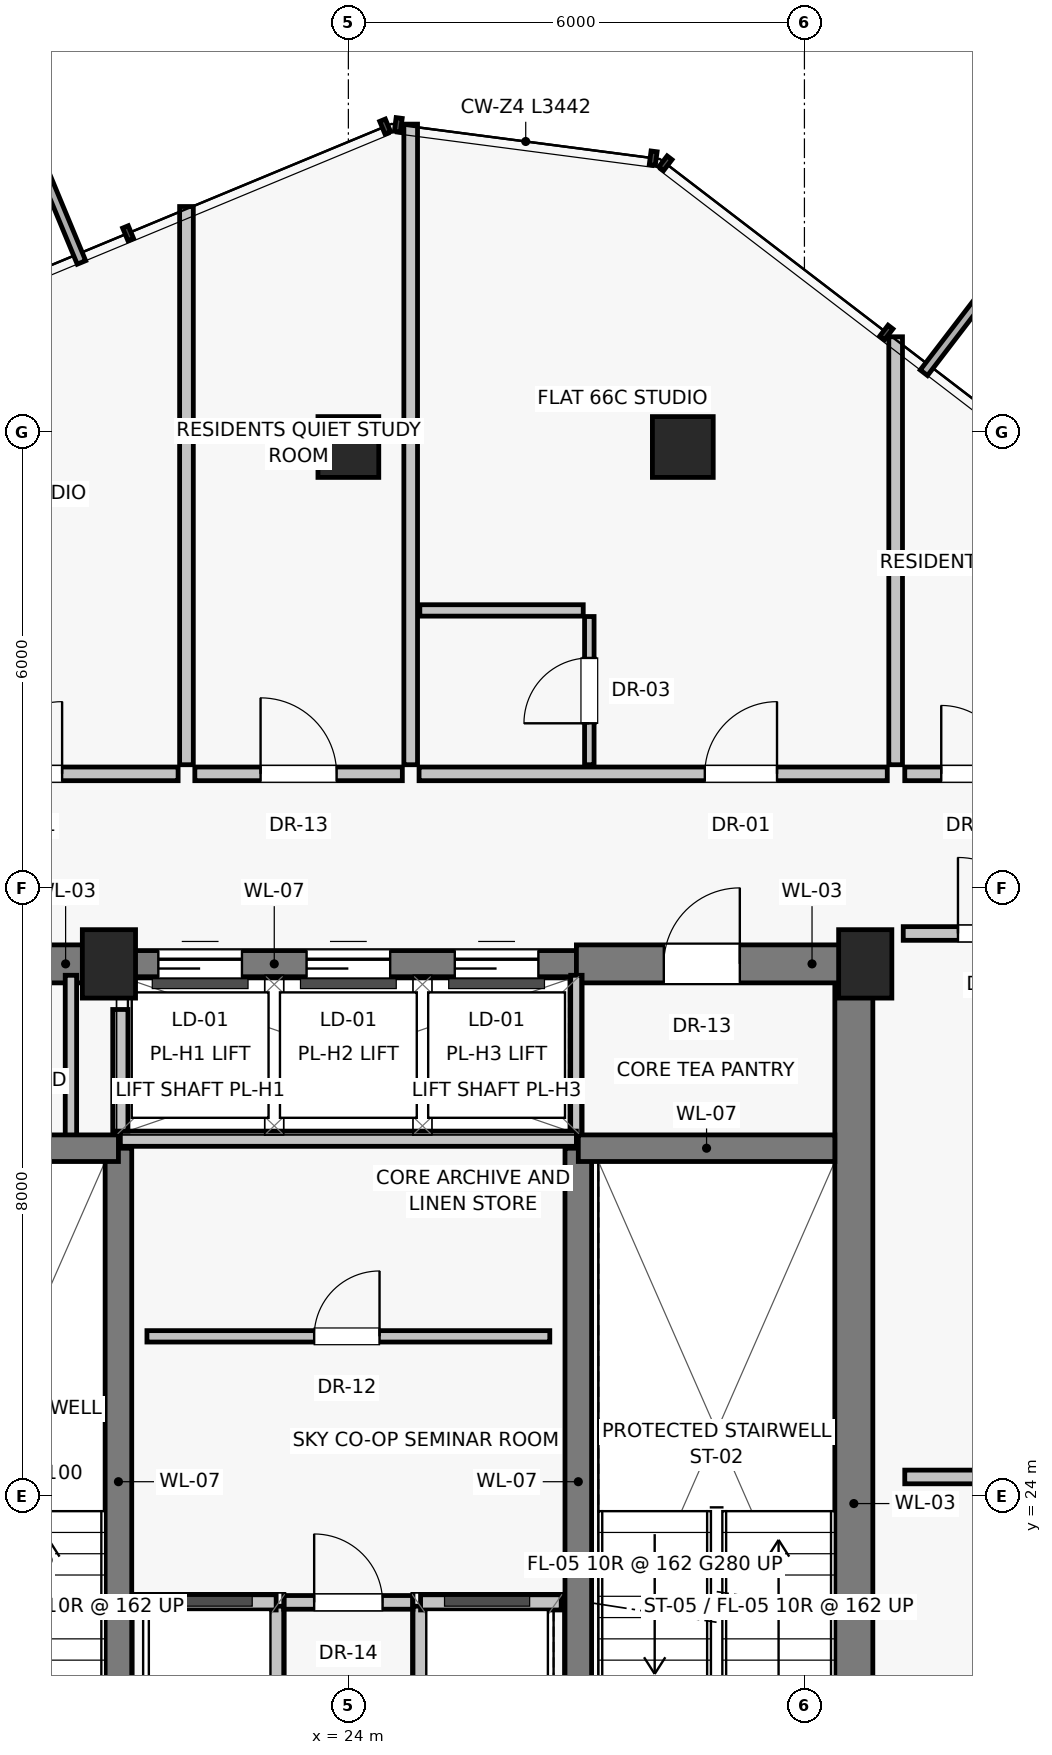
"""IFC4 building model, lengths in metres.
Left out: names, types, materials, properties, quantities, classifications, styles, units other than length and angle.
Written with IfcOpenShell. Run it as: python <this file> out.ifc"""

import sys

from ifc_helpers import new_model, si_unit, direction, frame, frame_2d, origin, origin_2d, place, context, subcontext, project, spatial, rectangle, extrude, source, transform, mapped, element, fill, save


model = new_model("IFC4")
c1 = context("Model", 3, precision=1e-05, world=origin(), true_north=direction((0.0, 1.0)))
c2 = subcontext(c1, "Body", "Model", "MODEL_VIEW")
j1 = project(units=[si_unit("LENGTHUNIT", "METRE"), si_unit("PLANEANGLEUNIT", "RADIAN")], contexts=[c1])
p1 = place(None, origin())
s1 = spatial("IfcSite", under=j1, at=p1, CompositionType="ELEMENT")
p2 = place(p1, origin())
s2 = spatial("IfcBuilding", under=s1, at=p2, CompositionType="ELEMENT")
p3 = place(p2, frame((0.0, 0.0, 233.3)))
s3 = spatial("IfcBuildingStorey", under=s2, at=p3, CompositionType="ELEMENT", Elevation=233.3)
for number, where, z_axis, x_axis in (
    (1, (20.85, 31.0, 0.0), (0.0, 0.0, 1.0), (1.0, 0.0, 0.0)),
    (2, (30.8, 31.0, 0.0), (0.0, 0.0, 1.0), (1.0, 0.0, 0.0)),
):
    element("IfcColumn", number, at=place(p3, frame(where, z_axis=z_axis, x_axis=x_axis)), inside=s3, PredefinedType="PILASTER", context=c2, shape_type="SweptSolid", body=[
        extrude(rectangle(XDim=0.7, YDim=0.9, at=origin_2d()), origin(), (0.0, 0.0, 1.0), 3.25),
    ])
for number, where, z_axis, x_axis in (
    (3, (28.4, 37.8, 0.0), (0.0, 0.0, 1.0), (1.0, 0.0, 0.0)),
    (4, (24.0, 37.8, 0.0), (0.0, 0.0, 1.0), (1.0, 0.0, 0.0)),
):
    element("IfcColumn", number, at=place(p3, frame(where, z_axis=z_axis, x_axis=x_axis)), inside=s3, PredefinedType="COLUMN", context=c2, shape_type="SweptSolid", body=[
        extrude(rectangle(XDim=0.8, YDim=0.8, at=origin_2d()), origin(), (0.0, 0.0, 1.0), 3.25),
    ])
p4 = place(p3, frame((30.65, 16.8, 0.0), z_axis=(0.0, 0.0, 1.0), x_axis=(0.0, 1.0, 0.0)))
e5 = element("IfcWall", 5, at=p4, inside=s3, PredefinedType="SHEAR", context=c2, shape_type="SweptSolid", body=[
    extrude(rectangle(XDim=14.2, YDim=0.5, at=frame_2d((7.1, 0.0))), origin(), (0.0, 0.0, 1.0), 3.015),
])
p5 = place(p3, frame((17.2, 31.0, 0.0), z_axis=(0.0, 0.0, 1.0), x_axis=(1.0, 0.0, 0.0)))
e6 = element("IfcWall", 6, at=p5, inside=s3, PredefinedType="SHEAR", context=c2, shape_type="SweptSolid", body=[
    extrude(rectangle(XDim=3.8, YDim=0.5, at=frame_2d((1.9, 0.0))), origin(), (0.0, 0.0, 1.0), 3.015),
])
p6 = place(p5, frame((1.25, 0.0, 0.0)))
e7 = element("IfcOpeningElement", 7, at=p6, cuts=e6, PredefinedType="OPENING", context=c2, shape_type="SweptSolid", body=[
    extrude(rectangle(XDim=0.86, YDim=2.01, at=frame_2d((0.43, 1.005))), frame((0.0, 0.26, 0.0), z_axis=(0.0, -1.0, 0.0), x_axis=(1.0, 0.0, 0.0)), (0.0, 0.0, 1.0), 0.52),
])
p7 = place(p3, frame((21.0, 31.0, 0.0), z_axis=(0.0, 0.0, 1.0), x_axis=(1.0, 0.0, 0.0)))
e8 = element("IfcWall", 8, at=p7, inside=s3, PredefinedType="SHEAR", context=c2, shape_type="SweptSolid", body=[
    extrude(rectangle(XDim=6.0, YDim=0.35, at=frame_2d((3.0, 0.0))), origin(), (0.0, 0.0, 1.0), 3.015),
])
p8 = place(p7, frame((0.5, 0.0, 0.0)))
e9 = element("IfcOpeningElement", 9, at=p8, cuts=e8, PredefinedType="OPENING", context=c2, shape_type="SweptSolid", body=[
    extrude(rectangle(XDim=1.1, YDim=2.08, at=frame_2d((0.55, 1.04))), frame((0.0, 0.185, 0.0), z_axis=(0.0, -1.0, 0.0), x_axis=(1.0, 0.0, 0.0)), (0.0, 0.0, 1.0), 0.37),
])
p9 = place(p7, frame((2.45, 0.0, 0.0)))
e10 = element("IfcOpeningElement", 10, at=p9, cuts=e8, PredefinedType="OPENING", context=c2, shape_type="SweptSolid", body=[
    extrude(rectangle(XDim=1.1, YDim=2.08, at=frame_2d((0.55, 1.04))), frame((0.0, 0.185, 0.0), z_axis=(0.0, -1.0, 0.0), x_axis=(1.0, 0.0, 0.0)), (0.0, 0.0, 1.0), 0.37),
])
p10 = place(p7, frame((4.4, 0.0, 0.0)))
e11 = element("IfcOpeningElement", 11, at=p10, cuts=e8, PredefinedType="OPENING", context=c2, shape_type="SweptSolid", body=[
    extrude(rectangle(XDim=1.1, YDim=2.08, at=frame_2d((0.55, 1.04))), frame((0.0, 0.185, 0.0), z_axis=(0.0, -1.0, 0.0), x_axis=(1.0, 0.0, 0.0)), (0.0, 0.0, 1.0), 0.37),
])
p11 = place(p3, frame((27.0, 31.0, 0.0), z_axis=(0.0, 0.0, 1.0), x_axis=(1.0, 0.0, 0.0)))
e12 = element("IfcWall", 12, at=p11, inside=s3, PredefinedType="SHEAR", context=c2, shape_type="SweptSolid", body=[
    extrude(rectangle(XDim=3.8, YDim=0.5, at=frame_2d((1.9, 0.0))), origin(), (0.0, 0.0, 1.0), 3.015),
])
p12 = place(p11, frame((1.15, 0.0, 0.0)))
e13 = element("IfcOpeningElement", 13, at=p12, cuts=e12, PredefinedType="OPENING", context=c2, shape_type="SweptSolid", body=[
    extrude(rectangle(XDim=1.0, YDim=2.01, at=frame_2d((0.5, 1.005))), frame((0.0, 0.26, 0.0), z_axis=(0.0, -1.0, 0.0), x_axis=(1.0, 0.0, 0.0)), (0.0, 0.0, 1.0), 0.52),
])
for number, where, z_axis, x_axis in (
    (14, (20.35, 28.65, 0.0), (0.0, 0.0, 1.0), (0.0, 1.0, 0.0)),
    (15, (27.0, 28.65, 0.0), (0.0, 0.0, 1.0), (0.0, 1.0, 0.0)),
):
    element("IfcWall", number, at=place(p3, frame(where, z_axis=z_axis, x_axis=x_axis)), inside=s3, PredefinedType="PARTITIONING", context=c2, shape_type="SweptSolid", body=[
        extrude(rectangle(XDim=2.2, YDim=0.15, at=frame_2d((1.1, 0.0))), origin(), (0.0, 0.0, 1.0), 3.015),
    ])
for number, where, z_axis, x_axis in (
    (16, (20.975, 19.8, 0.0), (0.0, 0.0, 1.0), (0.0, 1.0, 0.0)),
    (17, (27.025, 19.8, 0.0), (0.0, 0.0, 1.0), (0.0, 1.0, 0.0)),
):
    element("IfcWall", number, at=place(p3, frame(where, z_axis=z_axis, x_axis=x_axis)), inside=s3, PredefinedType="SHEAR", context=c2, shape_type="SweptSolid", body=[
        extrude(rectangle(XDim=8.775, YDim=0.35, at=frame_2d((4.387, 0.0))), origin(), (0.0, 0.0, 1.0), 3.015),
    ])
for number, where, z_axis, x_axis in (
    (18, (17.6, 28.575, 0.0), (0.0, 0.0, 1.0), (1.0, 0.0, 0.0)),
    (19, (27.025, 28.575, 0.0), (0.0, 0.0, 1.0), (1.0, 0.0, 0.0)),
):
    element("IfcWall", number, at=place(p3, frame(where, z_axis=z_axis, x_axis=x_axis)), inside=s3, PredefinedType="SHEAR", context=c2, shape_type="SweptSolid", body=[
        extrude(rectangle(XDim=3.375, YDim=0.35, at=frame_2d((1.688, 0.0))), origin(), (0.0, 0.0, 1.0), 3.015),
    ])
for number, where, z_axis, x_axis in (
    (20, (23.05, 16.95, 0.0), (0.0, 0.0, 1.0), (0.0, 1.0, 0.0)),
    (21, (24.95, 16.95, 0.0), (0.0, 0.0, 1.0), (0.0, 1.0, 0.0)),
):
    element("IfcWall", number, at=place(p3, frame(where, z_axis=z_axis, x_axis=x_axis)), inside=s3, PredefinedType="SOLIDWALL", context=c2, shape_type="SweptSolid", body=[
        extrude(rectangle(XDim=5.6, YDim=0.2, at=frame_2d((2.8, 0.0))), origin(), (0.0, 0.0, 1.0), 3.015),
    ])
for number, where, z_axis, x_axis in (
    (22, (21.2, 22.6, 0.0), (0.0, 0.0, 1.0), (1.0, 0.0, 0.0)),
    (23, (24.95, 22.6, 0.0), (0.0, 0.0, 1.0), (1.0, 0.0, 0.0)),
):
    element("IfcWall", number, at=place(p3, frame(where, z_axis=z_axis, x_axis=x_axis)), inside=s3, PredefinedType="SOLIDWALL", context=c2, shape_type="SweptSolid", body=[
        extrude(rectangle(XDim=1.85, YDim=0.2, at=frame_2d((0.925, 0.0))), origin(), (0.0, 0.0, 1.0), 3.015),
    ])
p13 = place(p3, frame((21.0, 28.7, 0.0), z_axis=(0.0, 0.0, 1.0), x_axis=(1.0, 0.0, 0.0)))
e24 = element("IfcWall", 24, at=p13, inside=s3, PredefinedType="SOLIDWALL", context=c2, shape_type="SweptSolid", body=[
    extrude(rectangle(XDim=6.0, YDim=0.2, at=frame_2d((3.0, 0.0))), origin(), (0.0, 0.0, 1.0), 3.015),
])
p14 = place(p3, frame((21.0, 28.8, 0.0), z_axis=(0.0, 0.0, 1.0), x_axis=(0.0, 1.0, 0.0)))
e25 = element("IfcWall", 25, at=p14, inside=s3, PredefinedType="SOLIDWALL", context=c2, shape_type="SweptSolid", body=[
    extrude(rectangle(XDim=1.6, YDim=0.2, at=frame_2d((0.8, 0.0))), origin(), (0.0, 0.0, 1.0), 3.015),
])
p15 = place(p3, frame((23.15, 22.6, 0.0), z_axis=(0.0, 0.0, 1.0), x_axis=(1.0, 0.0, 0.0)))
e26 = element("IfcWall", 26, at=p15, inside=s3, PredefinedType="PARTITIONING", context=c2, shape_type="SweptSolid", body=[
    extrude(rectangle(XDim=1.7, YDim=0.18, at=frame_2d((0.85, 0.0))), origin(), (0.0, 0.0, 1.0), 3.015),
])
p16 = place(p15, frame((0.4, 0.0, 0.0)))
e27 = element("IfcOpeningElement", 27, at=p16, cuts=e26, PredefinedType="OPENING", context=c2, shape_type="SweptSolid", body=[
    extrude(rectangle(XDim=0.9, YDim=2.01, at=frame_2d((0.45, 1.005))), frame((0.0, 0.1, 0.0), z_axis=(0.0, -1.0, 0.0), x_axis=(1.0, 0.0, 0.0)), (0.0, 0.0, 1.0), 0.2),
])
p17 = place(p3, frame((21.35, 26.1, 0.0), z_axis=(0.0, 0.0, 1.0), x_axis=(1.0, 0.0, 0.0)))
e28 = element("IfcWall", 28, at=p17, inside=s3, PredefinedType="PARTITIONING", context=c2, shape_type="SweptSolid", body=[
    extrude(rectangle(XDim=5.3, YDim=0.15, at=frame_2d((2.65, 0.0))), origin(), (0.0, 0.0, 1.0), 3.015),
])
p18 = place(p17, frame((2.2, 0.0, 0.0)))
e29 = element("IfcOpeningElement", 29, at=p18, cuts=e28, PredefinedType="OPENING", context=c2, shape_type="SweptSolid", body=[
    extrude(rectangle(XDim=0.86, YDim=2.01, at=frame_2d((0.43, 1.005))), frame((0.0, 0.085, 0.0), z_axis=(0.0, -1.0, 0.0), x_axis=(1.0, 0.0, 0.0)), (0.0, 0.0, 1.0), 0.17),
])
p19 = place(p3, frame((31.2, 33.62, 0.0), z_axis=(0.0, 0.0, 1.0), x_axis=(0.0, 1.0, 0.0)))
e30 = element("IfcWall", 30, at=p19, inside=s3, PredefinedType="PARTITIONING", context=c2, shape_type="SweptSolid", body=[
    extrude(rectangle(XDim=5.63, YDim=0.18, at=frame_2d((2.815, 0.0))), origin(), (0.0, 0.0, 1.0), 3.015),
])
p20 = place(p3, frame((21.98, 33.5, 0.0), z_axis=(0.0, 0.0, 1.0), x_axis=(1.0, 0.0, 0.0)))
e31 = element("IfcWall", 31, at=p20, inside=s3, PredefinedType="PARTITIONING", context=c2, shape_type="SweptSolid", body=[
    extrude(rectangle(XDim=2.73, YDim=0.18, at=frame_2d((1.365, 0.0))), origin(), (0.0, 0.0, 1.0), 3.015),
])
p21 = place(p20, frame((0.865, 0.0, 0.0)))
e32 = element("IfcOpeningElement", 32, at=p21, cuts=e31, PredefinedType="OPENING", context=c2, shape_type="SweptSolid", body=[
    extrude(rectangle(XDim=1.0, YDim=2.01, at=frame_2d((0.5, 1.005))), frame((0.0, 0.1, 0.0), z_axis=(0.0, -1.0, 0.0), x_axis=(1.0, 0.0, 0.0)), (0.0, 0.0, 1.0), 0.2),
])
p22 = place(p3, frame((21.87, 33.62, 0.0), z_axis=(0.0, 0.0, 1.0), x_axis=(0.0, 1.0, 0.0)))
e33 = element("IfcWall", 33, at=p22, inside=s3, PredefinedType="PARTITIONING", context=c2, shape_type="SweptSolid", body=[
    extrude(rectangle(XDim=7.344, YDim=0.18, at=frame_2d((3.672, 0.0))), origin(), (0.0, 0.0, 1.0), 3.015),
])
p23 = place(p3, frame((15.31, 33.5, 0.0), z_axis=(0.0, 0.0, 1.0), x_axis=(1.0, 0.0, 0.0)))
e34 = element("IfcWall", 34, at=p23, inside=s3, PredefinedType="PARTITIONING", context=c2, shape_type="SweptSolid", body=[
    extrude(rectangle(XDim=6.45, YDim=0.18, at=frame_2d((3.225, 0.0))), origin(), (0.0, 0.0, 1.0), 3.015),
])
p24 = place(p23, frame((3.974, 0.0, 0.0)))
e35 = element("IfcOpeningElement", 35, at=p24, cuts=e34, PredefinedType="OPENING", context=c2, shape_type="SweptSolid", body=[
    extrude(rectangle(XDim=0.95, YDim=2.02, at=frame_2d((0.475, 1.01))), frame((0.0, 0.1, 0.0), z_axis=(0.0, -1.0, 0.0), x_axis=(1.0, 0.0, 0.0)), (0.0, 0.0, 1.0), 0.2),
])
p25 = place(p3, frame((24.82, 33.62, 0.0), z_axis=(0.0, 0.0, 1.0), x_axis=(0.0, 1.0, 0.0)))
e36 = element("IfcWall", 36, at=p25, inside=s3, PredefinedType="PARTITIONING", context=c2, shape_type="SweptSolid", body=[
    extrude(rectangle(XDim=8.428, YDim=0.18, at=frame_2d((4.214, 0.0))), origin(), (0.0, 0.0, 1.0), 3.015),
])
p26 = place(p3, frame((24.93, 33.5, 0.0), z_axis=(0.0, 0.0, 1.0), x_axis=(1.0, 0.0, 0.0)))
e37 = element("IfcWall", 37, at=p26, inside=s3, PredefinedType="PARTITIONING", context=c2, shape_type="SweptSolid", body=[
    extrude(rectangle(XDim=6.16, YDim=0.18, at=frame_2d((3.08, 0.0))), origin(), (0.0, 0.0, 1.0), 3.015),
])
p27 = place(p26, frame((3.76, 0.0, 0.0)))
e38 = element("IfcOpeningElement", 38, at=p27, cuts=e37, PredefinedType="OPENING", context=c2, shape_type="SweptSolid", body=[
    extrude(rectangle(XDim=0.95, YDim=2.02, at=frame_2d((0.475, 1.01))), frame((0.0, 0.1, 0.0), z_axis=(0.0, -1.0, 0.0), x_axis=(1.0, 0.0, 0.0)), (0.0, 0.0, 1.0), 0.2),
])
p28 = place(p3, frame((27.17, 33.62, 0.0), z_axis=(0.0, 0.0, 1.0), x_axis=(0.0, 1.0, 0.0)))
e39 = element("IfcWall", 39, at=p28, inside=s3, PredefinedType="PARTITIONING", context=c2, shape_type="SweptSolid", body=[
    extrude(rectangle(XDim=1.95, YDim=0.125, at=frame_2d((0.975, 0.0))), origin(), (0.0, 0.0, 1.0), 3.015),
])
p29 = place(p28, frame((0.545, 0.0, 0.0)))
e40 = element("IfcOpeningElement", 40, at=p29, cuts=e39, PredefinedType="OPENING", context=c2, shape_type="SweptSolid", body=[
    extrude(rectangle(XDim=0.86, YDim=2.01, at=frame_2d((0.43, 1.005))), frame((0.0, 0.073, 0.0), z_axis=(0.0, -1.0, 0.0), x_axis=(1.0, 0.0, 0.0)), (0.0, 0.0, 1.0), 0.145),
])
p30 = place(p3, frame((24.94, 35.65, 0.0), z_axis=(0.0, 0.0, 1.0), x_axis=(1.0, 0.0, 0.0)))
e41 = element("IfcWall", 41, at=p30, inside=s3, PredefinedType="PARTITIONING", context=c2, shape_type="SweptSolid", body=[
    extrude(rectangle(XDim=2.15, YDim=0.15, at=frame_2d((1.075, 0.0))), origin(), (0.0, 0.0, 1.0), 3.015),
])
p31 = place(p3, frame((31.32, 24.25, 0.0), z_axis=(0.0, 0.0, 1.0), x_axis=(1.0, 0.0, 0.0)))
e42 = element("IfcWall", 42, at=p31, inside=s3, PredefinedType="PARTITIONING", context=c2, shape_type="SweptSolid", body=[
    extrude(rectangle(XDim=9.338, YDim=0.18, at=frame_2d((4.669, 0.0))), origin(), (0.0, 0.0, 1.0), 3.015),
])
p32 = place(p3, frame((31.3, 31.4, 0.0), z_axis=(0.0, 0.0, 1.0), x_axis=(1.0, 0.0, 0.0)))
e43 = element("IfcWall", 43, at=p32, inside=s3, PredefinedType="PARTITIONING", context=c2, shape_type="SweptSolid", body=[
    extrude(rectangle(XDim=1.92, YDim=0.18, at=frame_2d((0.96, 0.0))), origin(), (0.0, 0.0, 1.0), 3.015),
])
p33 = place(p32, frame((0.72, 0.0, 0.0)))
e44 = element("IfcOpeningElement", 44, at=p33, cuts=e43, PredefinedType="OPENING", context=c2, shape_type="SweptSolid", body=[
    extrude(rectangle(XDim=1.0, YDim=2.01, at=frame_2d((0.5, 1.005))), frame((0.0, 0.1, 0.0), z_axis=(0.0, -1.0, 0.0), x_axis=(1.0, 0.0, 0.0)), (0.0, 0.0, 1.0), 0.2),
])
p34 = place(p3, frame((31.32, 33.5, 0.0), z_axis=(0.0, 0.0, 1.0), x_axis=(1.0, 0.0, 0.0)))
e45 = element("IfcWall", 45, at=p34, inside=s3, PredefinedType="PARTITIONING", context=c2, shape_type="SweptSolid", body=[
    extrude(rectangle(XDim=1.86, YDim=0.18, at=frame_2d((0.93, 0.0))), origin(), (0.0, 0.0, 1.0), 3.015),
])
p35 = place(p34, frame((0.48, 0.0, 0.0)))
e46 = element("IfcOpeningElement", 46, at=p35, cuts=e45, PredefinedType="OPENING", context=c2, shape_type="SweptSolid", body=[
    extrude(rectangle(XDim=0.9, YDim=2.01, at=frame_2d((0.45, 1.005))), frame((0.0, 0.1, 0.0), z_axis=(0.0, -1.0, 0.0), x_axis=(1.0, 0.0, 0.0)), (0.0, 0.0, 1.0), 0.2),
])
m1 = source(origin(), c2, "Body", "SweptSolid", [
    extrude(rectangle(XDim=1.1, YDim=2.08, at=frame_2d((0.55, 1.04))), frame((0.0, 0.025, 0.0), z_axis=(0.0, -1.0, 0.0), x_axis=(1.0, 0.0, 0.0)), (0.0, 0.0, 1.0), 0.05),
])
p36 = place(p8, origin())
e47 = element("IfcDoor", 47, at=p36, inside=s3, OperationType="SLIDING_TO_LEFT", PredefinedType="DOOR", context=c2, shape_type="MappedRepresentation", body=[
    mapped(m1, transform((0.0, 0.0, 0.0), scale=1.0)),
])
fill(e9, e47)
p37 = place(p9, origin())
e48 = element("IfcDoor", 48, at=p37, inside=s3, OperationType="SLIDING_TO_LEFT", PredefinedType="DOOR", context=c2, shape_type="MappedRepresentation", body=[
    mapped(m1, transform((0.0, 0.0, 0.0), scale=1.0)),
])
fill(e10, e48)
p38 = place(p10, origin())
e49 = element("IfcDoor", 49, at=p38, inside=s3, OperationType="SLIDING_TO_LEFT", PredefinedType="DOOR", context=c2, shape_type="MappedRepresentation", body=[
    mapped(m1, transform((0.0, 0.0, 0.0), scale=1.0)),
])
fill(e11, e49)
m2 = source(origin(), c2, "Body", "SweptSolid", [
    extrude(rectangle(XDim=1.0, YDim=2.01, at=frame_2d((0.5, 1.005))), frame((0.0, 0.025, 0.0), z_axis=(0.0, -1.0, 0.0), x_axis=(1.0, 0.0, 0.0)), (0.0, 0.0, 1.0), 0.05),
])
p39 = place(p12, origin())
e50 = element("IfcDoor", 50, at=p39, inside=s3, OperationType="SINGLE_SWING_RIGHT", PredefinedType="DOOR", context=c2, shape_type="MappedRepresentation", body=[
    mapped(m2, transform((0.0, 0.0, 0.0), scale=1.0)),
])
fill(e13, e50)
m3 = source(origin(), c2, "Body", "SweptSolid", [
    extrude(rectangle(XDim=0.9, YDim=2.01, at=frame_2d((0.45, 1.005))), frame((0.0, 0.025, 0.0), z_axis=(0.0, -1.0, 0.0), x_axis=(1.0, 0.0, 0.0)), (0.0, 0.0, 1.0), 0.05),
])
p40 = place(p16, origin())
e51 = element("IfcDoor", 51, at=p40, inside=s3, OperationType="SINGLE_SWING_LEFT", PredefinedType="DOOR", context=c2, shape_type="MappedRepresentation", body=[
    mapped(m3, transform((0.0, 0.0, 0.0), scale=1.0)),
])
fill(e27, e51)
m4 = source(origin(), c2, "Body", "SweptSolid", [
    extrude(rectangle(XDim=0.86, YDim=2.01, at=frame_2d((0.43, 1.005))), frame((0.0, 0.025, 0.0), z_axis=(0.0, -1.0, 0.0), x_axis=(1.0, 0.0, 0.0)), (0.0, 0.0, 1.0), 0.05),
])
p41 = place(p18, origin())
e52 = element("IfcDoor", 52, at=p41, inside=s3, OperationType="SINGLE_SWING_RIGHT", PredefinedType="DOOR", context=c2, shape_type="MappedRepresentation", body=[
    mapped(m4, transform((0.0, 0.0, 0.0), scale=1.0)),
])
fill(e29, e52)
p42 = place(p21, origin())
e53 = element("IfcDoor", 53, at=p42, inside=s3, OperationType="SINGLE_SWING_LEFT", PredefinedType="DOOR", context=c2, shape_type="MappedRepresentation", body=[
    mapped(m2, transform((0.0, 0.0, 0.0), scale=1.0)),
])
fill(e32, e53)
m5 = source(origin(), c2, "Body", "SweptSolid", [
    extrude(rectangle(XDim=0.95, YDim=2.02, at=frame_2d((0.475, 1.01))), frame((0.0, 0.025, 0.0), z_axis=(0.0, -1.0, 0.0), x_axis=(1.0, 0.0, 0.0)), (0.0, 0.0, 1.0), 0.05),
])
p43 = place(p24, origin())
e54 = element("IfcDoor", 54, at=p43, inside=s3, OperationType="SINGLE_SWING_RIGHT", PredefinedType="DOOR", context=c2, shape_type="MappedRepresentation", body=[
    mapped(m5, transform((0.0, 0.0, 0.0), scale=1.0)),
])
fill(e35, e54)
p44 = place(p27, origin())
e55 = element("IfcDoor", 55, at=p44, inside=s3, OperationType="SINGLE_SWING_RIGHT", PredefinedType="DOOR", context=c2, shape_type="MappedRepresentation", body=[
    mapped(m5, transform((0.0, 0.0, 0.0), scale=1.0)),
])
fill(e38, e55)
p45 = place(p29, origin())
e56 = element("IfcDoor", 56, at=p45, inside=s3, OperationType="SINGLE_SWING_LEFT", PredefinedType="DOOR", context=c2, shape_type="MappedRepresentation", body=[
    mapped(m4, transform((0.0, 0.0, 0.0), scale=1.0)),
])
fill(e40, e56)
p46 = place(p33, origin())
e57 = element("IfcDoor", 57, at=p46, inside=s3, OperationType="SINGLE_SWING_LEFT", PredefinedType="DOOR", context=c2, shape_type="MappedRepresentation", body=[
    mapped(m2, transform((0.0, 0.0, 0.0), scale=1.0)),
])
fill(e44, e57)
p47 = place(p35, origin())
e58 = element("IfcDoor", 58, at=p47, inside=s3, OperationType="SINGLE_SWING_LEFT", PredefinedType="DOOR", context=c2, shape_type="MappedRepresentation", body=[
    mapped(m3, transform((0.0, 0.0, 0.0), scale=1.0)),
])
fill(e46, e58)
save(model, sys.argv[1])
